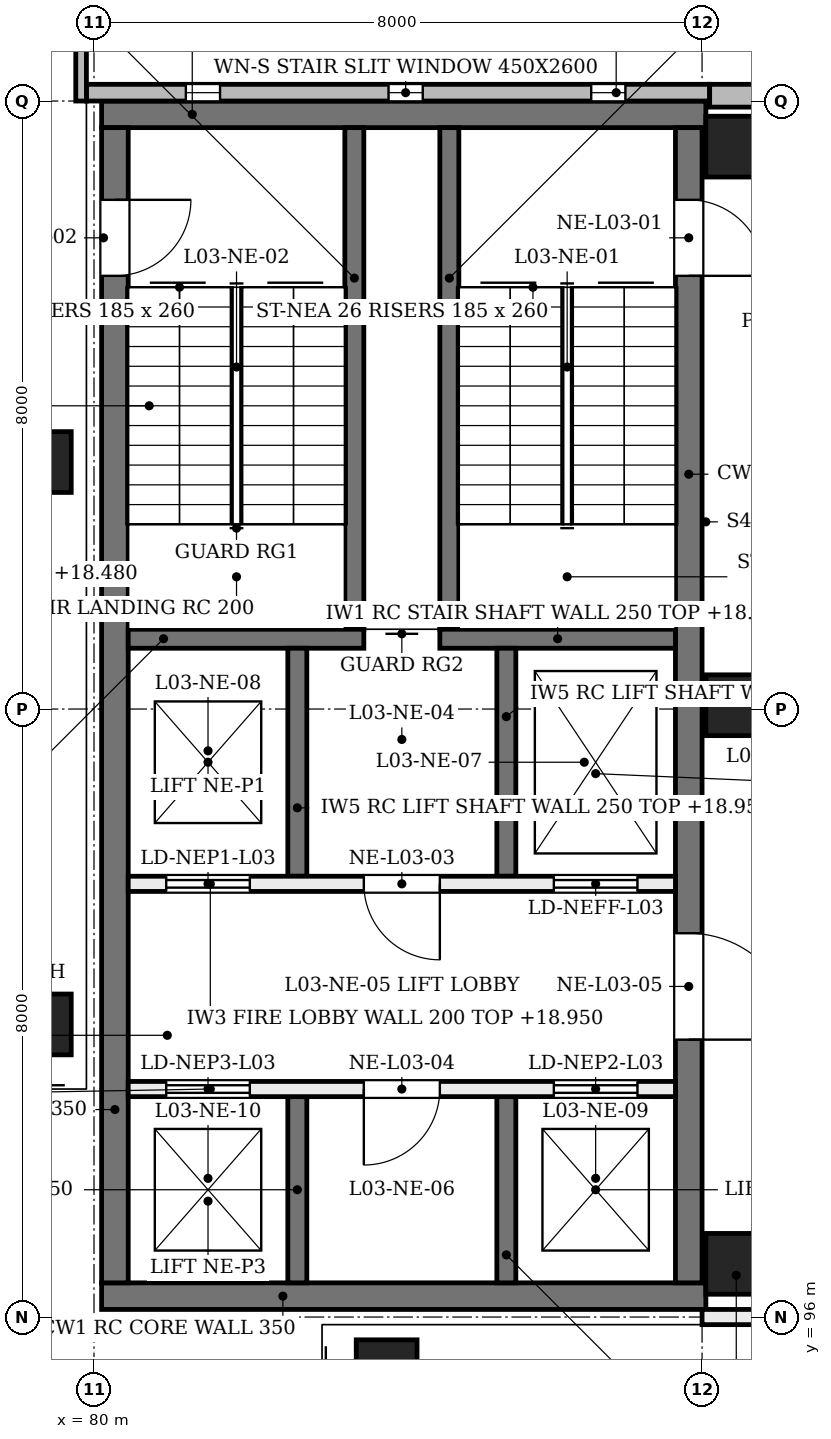
"""IFC4 building model, lengths in metres.
Left out: names, types, materials, properties, quantities, classifications, styles, units other than length and angle.
Written with IfcOpenShell. Run it as: python <this file> out.ifc"""

import sys

from ifc_helpers import new_model, si_unit, direction, frame, frame_2d, origin, origin_2d, place, context, subcontext, project, spatial, rectangle, extrude, element, fill, save


model = new_model("IFC4")
c1 = context("Model", 3, precision=1e-05, world=origin(), true_north=direction((0.0, 1.0)))
c2 = subcontext(c1, "Body", "Model", "MODEL_VIEW")
j1 = project(units=[si_unit("LENGTHUNIT", "METRE"), si_unit("PLANEANGLEUNIT", "RADIAN")], contexts=[c1])
p1 = place(None, origin())
s1 = spatial("IfcSite", under=j1, at=p1, CompositionType="ELEMENT")
p2 = place(p1, origin())
s2 = spatial("IfcBuilding", under=s1, at=p2, CompositionType="ELEMENT")
p3 = place(p2, frame((0.0, 0.0, 14.4)))
s3 = spatial("IfcBuildingStorey", under=s2, at=p3, CompositionType="ELEMENT", Elevation=14.4)
for number, where, z_axis, x_axis in (
    (1, (80.1, 96.275, 0.0), (0.0, 0.0, 1.0), (1.0, 0.0, 0.0)),
    (2, (80.1, 111.825, 0.0), (0.0, 0.0, 1.0), (1.0, 0.0, 0.0)),
):
    element("IfcWall", number, at=place(p3, frame(where, z_axis=z_axis, x_axis=x_axis)), inside=s3, PredefinedType="SHEAR", context=c2, shape_type="SweptSolid", body=[
        extrude(rectangle(XDim=7.95, YDim=0.35, at=frame_2d((3.975, 0.0))), origin(), (0.0, 0.0, 1.0), 4.58),
    ])
p4 = place(p3, frame((80.275, 96.45, 0.0), z_axis=(0.0, 0.0, 1.0), x_axis=(0.0, 1.0, 0.0)))
e3 = element("IfcWall", 3, at=p4, inside=s3, PredefinedType="SHEAR", context=c2, shape_type="SweptSolid", body=[
    extrude(rectangle(XDim=15.2, YDim=0.35, at=frame_2d((7.6, 0.0))), origin(), (0.0, 0.0, 1.0), 4.58),
])
p5 = place(p4, frame((13.25, 0.0, 0.0)))
e4 = element("IfcOpeningElement", 4, at=p5, cuts=e3, PredefinedType="OPENING", context=c2, shape_type="SweptSolid", body=[
    extrude(rectangle(XDim=1.0, YDim=2.1, at=frame_2d((0.5, 1.05))), frame((0.0, 0.185, 0.0), z_axis=(0.0, -1.0, 0.0), x_axis=(1.0, 0.0, 0.0)), (0.0, 0.0, 1.0), 0.37),
])
p6 = place(p3, frame((87.825, 96.45, 0.0), z_axis=(0.0, 0.0, 1.0), x_axis=(0.0, 1.0, 0.0)))
e5 = element("IfcWall", 5, at=p6, inside=s3, PredefinedType="SHEAR", context=c2, shape_type="SweptSolid", body=[
    extrude(rectangle(XDim=15.2, YDim=0.35, at=frame_2d((7.6, 0.0))), origin(), (0.0, 0.0, 1.0), 4.58),
])
p7 = place(p6, frame((13.25, 0.0, 0.0)))
e6 = element("IfcOpeningElement", 6, at=p7, cuts=e5, PredefinedType="OPENING", context=c2, shape_type="SweptSolid", body=[
    extrude(rectangle(XDim=1.0, YDim=2.1, at=frame_2d((0.5, 1.05))), frame((0.0, 0.185, 0.0), z_axis=(0.0, -1.0, 0.0), x_axis=(1.0, 0.0, 0.0)), (0.0, 0.0, 1.0), 0.37),
])
p8 = place(p6, frame((3.2, 0.0, 0.0)))
e7 = element("IfcOpeningElement", 7, at=p8, cuts=e5, PredefinedType="OPENING", context=c2, shape_type="SweptSolid", body=[
    extrude(rectangle(XDim=1.4, YDim=2.1, at=frame_2d((0.7, 1.05))), frame((0.0, 0.185, 0.0), z_axis=(0.0, -1.0, 0.0), x_axis=(1.0, 0.0, 0.0)), (0.0, 0.0, 1.0), 0.37),
])
for number, where, z_axis, x_axis in (
    (8, (88.45, 96.7, 0.0), (0.0, 0.0, 1.0), (1.0, 0.0, 0.0)),
    (9, (88.45, 104.05, 0.0), (0.0, 0.0, 1.0), (1.0, 0.0, 0.0)),
    (10, (88.45, 111.4, 0.0), (0.0, 0.0, 1.0), (1.0, 0.0, 0.0)),
):
    element("IfcColumn", number, at=place(p3, frame(where, z_axis=z_axis, x_axis=x_axis)), inside=s3, PredefinedType="COLUMN", context=c2, shape_type="SweptSolid", body=[
        extrude(rectangle(XDim=0.8, YDim=0.8, at=origin_2d()), origin(), (0.0, 0.0, 1.0), 4.8),
    ])
for number, where, z_axis, x_axis in (
    (11, (79.3, 99.6, 0.0), (0.0, 0.204, 0.979), (-1.0, 0.0, 0.0)),
    (12, (79.3, 107.0, 0.0), (0.0, 0.204, 0.979), (-1.0, 0.0, 0.0)),
    (13, (83.6, 95.3, 0.0), (0.204, 0.0, 0.979), (0.0, 1.0, 0.0)),
):
    element("IfcColumn", number, at=place(p3, frame(where, z_axis=z_axis, x_axis=x_axis)), inside=s3, PredefinedType="COLUMN", context=c2, shape_type="SweptSolid", body=[
        extrude(rectangle(XDim=0.8, YDim=0.8, at=origin_2d()), origin(), (0.0, 0.0, 1.0), 4.903),
    ])
p9 = place(p3, frame((79.9, 112.11, 0.0), z_axis=(0.0, 0.0, 1.0), x_axis=(1.0, 0.0, 0.0)))
e14 = element("IfcWall", 14, at=p9, inside=s3, PredefinedType="SOLIDWALL", context=c2, shape_type="SweptSolid", body=[
    extrude(rectangle(XDim=8.2, YDim=0.22, at=frame_2d((4.1, 0.0))), origin(), (0.0, 0.0, 1.0), 3.9),
])
p10 = place(p9, frame((1.308, 0.0, 0.9)))
e15 = element("IfcOpeningElement", 15, at=p10, cuts=e14, PredefinedType="OPENING", context=c2, shape_type="SweptSolid", body=[
    extrude(rectangle(XDim=0.45, YDim=2.6, at=frame_2d((0.225, 1.3))), frame((0.0, 0.12, 0.0), z_axis=(0.0, -1.0, 0.0), x_axis=(1.0, 0.0, 0.0)), (0.0, 0.0, 1.0), 0.24),
])
p11 = place(p9, frame((3.975, 0.0, 0.9)))
e16 = element("IfcOpeningElement", 16, at=p11, cuts=e14, PredefinedType="OPENING", context=c2, shape_type="SweptSolid", body=[
    extrude(rectangle(XDim=0.45, YDim=2.6, at=frame_2d((0.225, 1.3))), frame((0.0, 0.12, 0.0), z_axis=(0.0, -1.0, 0.0), x_axis=(1.0, 0.0, 0.0)), (0.0, 0.0, 1.0), 0.24),
])
p12 = place(p9, frame((6.642, 0.0, 0.9)))
e17 = element("IfcOpeningElement", 17, at=p12, cuts=e14, PredefinedType="OPENING", context=c2, shape_type="SweptSolid", body=[
    extrude(rectangle(XDim=0.45, YDim=2.6, at=frame_2d((0.225, 1.3))), frame((0.0, 0.12, 0.0), z_axis=(0.0, -1.0, 0.0), x_axis=(1.0, 0.0, 0.0)), (0.0, 0.0, 1.0), 0.24),
])
p13 = place(p3, frame((88.1, 112.07, 0.0), z_axis=(0.0, 0.0, 1.0), x_axis=(1.0, 0.0, 0.0)))
e18 = element("IfcWall", 18, at=p13, inside=s3, PredefinedType="SOLIDWALL", context=c2, shape_type="SweptSolid", body=[
    extrude(rectangle(XDim=7.9, YDim=0.3, at=frame_2d((3.95, 0.0))), origin(), (0.0, 0.0, 1.0), 3.9),
])
p14 = place(p13, frame((0.717, 0.0, 0.75)))
e19 = element("IfcOpeningElement", 19, at=p14, cuts=e18, PredefinedType="OPENING", context=c2, shape_type="SweptSolid", body=[
    extrude(rectangle(XDim=1.2, YDim=3.1, at=frame_2d((0.6, 1.55))), frame((0.0, 0.16, 0.0), z_axis=(0.0, -1.0, 0.0), x_axis=(1.0, 0.0, 0.0)), (0.0, 0.0, 1.0), 0.32),
])
p15 = place(p13, frame((3.35, 0.0, 0.75)))
e20 = element("IfcOpeningElement", 20, at=p15, cuts=e18, PredefinedType="OPENING", context=c2, shape_type="SweptSolid", body=[
    extrude(rectangle(XDim=1.2, YDim=3.1, at=frame_2d((0.6, 1.55))), frame((0.0, 0.16, 0.0), z_axis=(0.0, -1.0, 0.0), x_axis=(1.0, 0.0, 0.0)), (0.0, 0.0, 1.0), 0.32),
])
p16 = place(p13, frame((5.983, 0.0, 0.75)))
e21 = element("IfcOpeningElement", 21, at=p16, cuts=e18, PredefinedType="OPENING", context=c2, shape_type="SweptSolid", body=[
    extrude(rectangle(XDim=1.2, YDim=3.1, at=frame_2d((0.6, 1.55))), frame((0.0, 0.16, 0.0), z_axis=(0.0, -1.0, 0.0), x_axis=(1.0, 0.0, 0.0)), (0.0, 0.0, 1.0), 0.32),
])
p17 = place(p3, frame((79.83, 112.0, 0.0), z_axis=(0.0, 0.0, 1.0), x_axis=(0.0, 1.0, 0.0)))
e22 = element("IfcWall", 22, at=p17, inside=s3, PredefinedType="SOLIDWALL", context=c2, shape_type="SweptSolid", body=[
    extrude(rectangle(XDim=3.0, YDim=0.14, at=frame_2d((1.5, 0.0))), origin(), (0.0, 0.0, 1.0), 3.9),
])
for number, where, z_axis, x_axis in (
    (23, (84.675, 111.65, 0.0), (0.0, 0.0, 1.0), (0.0, -1.0, 0.0)),
    (24, (83.425, 111.65, 0.0), (0.0, 0.0, 1.0), (0.0, -1.0, 0.0)),
):
    element("IfcWall", number, at=place(p3, frame(where, z_axis=z_axis, x_axis=x_axis)), inside=s3, PredefinedType="SOLIDWALL", context=c2, shape_type="SweptSolid", body=[
        extrude(rectangle(XDim=6.6, YDim=0.25, at=frame_2d((3.3, 0.0))), origin(), (0.0, 0.0, 1.0), 4.55),
    ])
p18 = place(p3, frame((87.65, 104.925, 0.0), z_axis=(0.0, 0.0, 1.0), x_axis=(-1.0, 0.0, 0.0)))
e25 = element("IfcWall", 25, at=p18, inside=s3, PredefinedType="SOLIDWALL", context=c2, shape_type="SweptSolid", body=[
    extrude(rectangle(XDim=3.1, YDim=0.25, at=frame_2d((1.55, 0.0))), origin(), (0.0, 0.0, 1.0), 4.55),
])
p19 = place(p3, frame((83.55, 104.925, 0.0), z_axis=(0.0, 0.0, 1.0), x_axis=(-1.0, 0.0, 0.0)))
e26 = element("IfcWall", 26, at=p19, inside=s3, PredefinedType="SOLIDWALL", context=c2, shape_type="SweptSolid", body=[
    extrude(rectangle(XDim=3.1, YDim=0.25, at=frame_2d((1.55, 0.0))), origin(), (0.0, 0.0, 1.0), 4.55),
])
p20 = place(p3, frame((85.425, 104.8, 0.0), z_axis=(0.0, 0.0, 1.0), x_axis=(0.0, -1.0, 0.0)))
e27 = element("IfcWall", 27, at=p20, inside=s3, PredefinedType="SOLIDWALL", context=c2, shape_type="SweptSolid", body=[
    extrude(rectangle(XDim=3.0, YDim=0.25, at=frame_2d((1.5, 0.0))), origin(), (0.0, 0.0, 1.0), 4.55),
])
p21 = place(p3, frame((85.425, 98.9, 0.0), z_axis=(0.0, 0.0, 1.0), x_axis=(0.0, -1.0, 0.0)))
e28 = element("IfcWall", 28, at=p21, inside=s3, PredefinedType="SOLIDWALL", context=c2, shape_type="SweptSolid", body=[
    extrude(rectangle(XDim=2.45, YDim=0.25, at=frame_2d((1.225, 0.0))), origin(), (0.0, 0.0, 1.0), 4.55),
])
p22 = place(p3, frame((82.675, 104.8, 0.0), z_axis=(0.0, 0.0, 1.0), x_axis=(0.0, -1.0, 0.0)))
e29 = element("IfcWall", 29, at=p22, inside=s3, PredefinedType="SOLIDWALL", context=c2, shape_type="SweptSolid", body=[
    extrude(rectangle(XDim=3.0, YDim=0.25, at=frame_2d((1.5, 0.0))), origin(), (0.0, 0.0, 1.0), 4.55),
])
p23 = place(p3, frame((82.675, 98.9, 0.0), z_axis=(0.0, 0.0, 1.0), x_axis=(0.0, -1.0, 0.0)))
e30 = element("IfcWall", 30, at=p23, inside=s3, PredefinedType="SOLIDWALL", context=c2, shape_type="SweptSolid", body=[
    extrude(rectangle(XDim=2.45, YDim=0.25, at=frame_2d((1.225, 0.0))), origin(), (0.0, 0.0, 1.0), 4.55),
])
p24 = place(p3, frame((87.65, 101.7, 0.0), z_axis=(0.0, 0.0, 1.0), x_axis=(-1.0, 0.0, 0.0)))
e31 = element("IfcWall", 31, at=p24, inside=s3, PredefinedType="SOLIDWALL", context=c2, shape_type="SweptSolid", body=[
    extrude(rectangle(XDim=7.2, YDim=0.2, at=frame_2d((3.6, 0.0))), origin(), (0.0, 0.0, 1.0), 4.55),
])
p25 = place(p24, frame((0.5, 0.0, 0.0)))
e32 = element("IfcOpeningElement", 32, at=p25, cuts=e31, PredefinedType="OPENING", context=c2, shape_type="SweptSolid", body=[
    extrude(rectangle(XDim=1.1, YDim=2.1, at=frame_2d((0.55, 1.05))), frame((0.0, 0.11, 0.0), z_axis=(0.0, -1.0, 0.0), x_axis=(1.0, 0.0, 0.0)), (0.0, 0.0, 1.0), 0.22),
])
p26 = place(p24, frame((5.6, 0.0, 0.0)))
e33 = element("IfcOpeningElement", 33, at=p26, cuts=e31, PredefinedType="OPENING", context=c2, shape_type="SweptSolid", body=[
    extrude(rectangle(XDim=1.1, YDim=2.1, at=frame_2d((0.55, 1.05))), frame((0.0, 0.11, 0.0), z_axis=(0.0, -1.0, 0.0), x_axis=(1.0, 0.0, 0.0)), (0.0, 0.0, 1.0), 0.22),
])
p27 = place(p24, frame((3.1, 0.0, 0.0)))
e34 = element("IfcOpeningElement", 34, at=p27, cuts=e31, PredefinedType="OPENING", context=c2, shape_type="SweptSolid", body=[
    extrude(rectangle(XDim=1.0, YDim=2.1, at=frame_2d((0.5, 1.05))), frame((0.0, 0.11, 0.0), z_axis=(0.0, -1.0, 0.0), x_axis=(1.0, 0.0, 0.0)), (0.0, 0.0, 1.0), 0.22),
])
p28 = place(p3, frame((87.65, 99.0, 0.0), z_axis=(0.0, 0.0, 1.0), x_axis=(-1.0, 0.0, 0.0)))
e35 = element("IfcWall", 35, at=p28, inside=s3, PredefinedType="SOLIDWALL", context=c2, shape_type="SweptSolid", body=[
    extrude(rectangle(XDim=7.2, YDim=0.2, at=frame_2d((3.6, 0.0))), origin(), (0.0, 0.0, 1.0), 4.55),
])
p29 = place(p28, frame((0.5, 0.0, 0.0)))
e36 = element("IfcOpeningElement", 36, at=p29, cuts=e35, PredefinedType="OPENING", context=c2, shape_type="SweptSolid", body=[
    extrude(rectangle(XDim=1.1, YDim=2.1, at=frame_2d((0.55, 1.05))), frame((0.0, 0.11, 0.0), z_axis=(0.0, -1.0, 0.0), x_axis=(1.0, 0.0, 0.0)), (0.0, 0.0, 1.0), 0.22),
])
p30 = place(p28, frame((5.6, 0.0, 0.0)))
e37 = element("IfcOpeningElement", 37, at=p30, cuts=e35, PredefinedType="OPENING", context=c2, shape_type="SweptSolid", body=[
    extrude(rectangle(XDim=1.1, YDim=2.1, at=frame_2d((0.55, 1.05))), frame((0.0, 0.11, 0.0), z_axis=(0.0, -1.0, 0.0), x_axis=(1.0, 0.0, 0.0)), (0.0, 0.0, 1.0), 0.22),
])
p31 = place(p28, frame((3.1, 0.0, 0.0)))
e38 = element("IfcOpeningElement", 38, at=p31, cuts=e35, PredefinedType="OPENING", context=c2, shape_type="SweptSolid", body=[
    extrude(rectangle(XDim=1.0, YDim=2.1, at=frame_2d((0.5, 1.05))), frame((0.0, 0.11, 0.0), z_axis=(0.0, -1.0, 0.0), x_axis=(1.0, 0.0, 0.0)), (0.0, 0.0, 1.0), 0.22),
])
p32 = place(p3, frame((88.0, 96.0, 0.0), z_axis=(0.0, 0.0, 1.0), x_axis=(1.0, 0.0, 0.0)))
e39 = element("IfcWall", 39, at=p32, inside=s3, PredefinedType="PARTITIONING", context=c2, shape_type="SweptSolid", body=[
    extrude(rectangle(XDim=3.6, YDim=0.2, at=frame_2d((1.8, 0.0))), origin(), (0.0, 0.0, 1.0), 3.88),
])
p33 = place(p32, frame((1.3, 0.0, 0.0)))
e40 = element("IfcOpeningElement", 40, at=p33, cuts=e39, PredefinedType="OPENING", context=c2, shape_type="SweptSolid", body=[
    extrude(rectangle(XDim=1.0, YDim=2.1, at=frame_2d((0.5, 1.05))), frame((0.0, 0.11, 0.0), z_axis=(0.0, -1.0, 0.0), x_axis=(1.0, 0.0, 0.0)), (0.0, 0.0, 1.0), 0.22),
])
p34 = place(p10, origin())
e41 = element("IfcWindow", 41, at=p34, inside=s3, PartitioningType="SINGLE_PANEL", PredefinedType="WINDOW", context=c2, shape_type="SweptSolid", body=[
    extrude(rectangle(XDim=0.45, YDim=2.6, at=frame_2d((0.225, 1.3))), frame((0.0, 0.03, 0.0), z_axis=(0.0, -1.0, 0.0), x_axis=(1.0, 0.0, 0.0)), (0.0, 0.0, 1.0), 0.06),
])
fill(e15, e41)
p35 = place(p11, origin())
e42 = element("IfcWindow", 42, at=p35, inside=s3, PartitioningType="SINGLE_PANEL", PredefinedType="WINDOW", context=c2, shape_type="SweptSolid", body=[
    extrude(rectangle(XDim=0.45, YDim=2.6, at=frame_2d((0.225, 1.3))), frame((0.0, 0.03, 0.0), z_axis=(0.0, -1.0, 0.0), x_axis=(1.0, 0.0, 0.0)), (0.0, 0.0, 1.0), 0.06),
])
fill(e16, e42)
p36 = place(p12, origin())
e43 = element("IfcWindow", 43, at=p36, inside=s3, PartitioningType="SINGLE_PANEL", PredefinedType="WINDOW", context=c2, shape_type="SweptSolid", body=[
    extrude(rectangle(XDim=0.45, YDim=2.6, at=frame_2d((0.225, 1.3))), frame((0.0, 0.03, 0.0), z_axis=(0.0, -1.0, 0.0), x_axis=(1.0, 0.0, 0.0)), (0.0, 0.0, 1.0), 0.06),
])
fill(e17, e43)
p37 = place(p7, frame((1.0, 0.0, 0.0), z_axis=(0.0, 0.0, 1.0), x_axis=(-1.0, 0.0, 0.0)))
e44 = element("IfcDoor", 44, at=p37, inside=s3, OperationType="SINGLE_SWING_LEFT", PredefinedType="DOOR", context=c2, shape_type="SweptSolid", body=[
    extrude(rectangle(XDim=1.0, YDim=2.1, at=frame_2d((0.5, 1.05))), frame((0.0, 0.025, 0.0), z_axis=(0.0, -1.0, 0.0), x_axis=(1.0, 0.0, 0.0)), (0.0, 0.0, 1.0), 0.05),
])
fill(e6, e44)
p38 = place(p5, origin())
e45 = element("IfcDoor", 45, at=p38, inside=s3, OperationType="SINGLE_SWING_RIGHT", PredefinedType="DOOR", context=c2, shape_type="SweptSolid", body=[
    extrude(rectangle(XDim=1.0, YDim=2.1, at=frame_2d((0.5, 1.05))), frame((0.0, 0.025, 0.0), z_axis=(0.0, -1.0, 0.0), x_axis=(1.0, 0.0, 0.0)), (0.0, 0.0, 1.0), 0.05),
])
fill(e4, e45)
p39 = place(p25, origin())
e46 = element("IfcDoor", 46, at=p39, inside=s3, OperationType="DOUBLE_DOOR_SLIDING", PredefinedType="DOOR", context=c2, shape_type="SweptSolid", body=[
    extrude(rectangle(XDim=1.1, YDim=2.1, at=frame_2d((0.55, 1.05))), frame((0.0, 0.025, 0.0), z_axis=(0.0, -1.0, 0.0), x_axis=(1.0, 0.0, 0.0)), (0.0, 0.0, 1.0), 0.05),
])
fill(e32, e46)
p40 = place(p26, origin())
e47 = element("IfcDoor", 47, at=p40, inside=s3, OperationType="DOUBLE_DOOR_SLIDING", PredefinedType="DOOR", context=c2, shape_type="SweptSolid", body=[
    extrude(rectangle(XDim=1.1, YDim=2.1, at=frame_2d((0.55, 1.05))), frame((0.0, 0.025, 0.0), z_axis=(0.0, -1.0, 0.0), x_axis=(1.0, 0.0, 0.0)), (0.0, 0.0, 1.0), 0.05),
])
fill(e33, e47)
p41 = place(p29, frame((1.1, 0.0, 0.0), z_axis=(0.0, 0.0, 1.0), x_axis=(-1.0, 0.0, 0.0)))
e48 = element("IfcDoor", 48, at=p41, inside=s3, OperationType="DOUBLE_DOOR_SLIDING", PredefinedType="DOOR", context=c2, shape_type="SweptSolid", body=[
    extrude(rectangle(XDim=1.1, YDim=2.1, at=frame_2d((0.55, 1.05))), frame((0.0, 0.025, 0.0), z_axis=(0.0, -1.0, 0.0), x_axis=(1.0, 0.0, 0.0)), (0.0, 0.0, 1.0), 0.05),
])
fill(e36, e48)
p42 = place(p30, frame((1.1, 0.0, 0.0), z_axis=(0.0, 0.0, 1.0), x_axis=(-1.0, 0.0, 0.0)))
e49 = element("IfcDoor", 49, at=p42, inside=s3, OperationType="DOUBLE_DOOR_SLIDING", PredefinedType="DOOR", context=c2, shape_type="SweptSolid", body=[
    extrude(rectangle(XDim=1.1, YDim=2.1, at=frame_2d((0.55, 1.05))), frame((0.0, 0.025, 0.0), z_axis=(0.0, -1.0, 0.0), x_axis=(1.0, 0.0, 0.0)), (0.0, 0.0, 1.0), 0.05),
])
fill(e37, e49)
p43 = place(p27, origin())
e50 = element("IfcDoor", 50, at=p43, inside=s3, OperationType="SINGLE_SWING_LEFT", PredefinedType="DOOR", context=c2, shape_type="SweptSolid", body=[
    extrude(rectangle(XDim=1.0, YDim=2.1, at=frame_2d((0.5, 1.05))), frame((0.0, 0.025, 0.0), z_axis=(0.0, -1.0, 0.0), x_axis=(1.0, 0.0, 0.0)), (0.0, 0.0, 1.0), 0.05),
])
fill(e34, e50)
p44 = place(p31, frame((1.0, 0.0, 0.0), z_axis=(0.0, 0.0, 1.0), x_axis=(-1.0, 0.0, 0.0)))
e51 = element("IfcDoor", 51, at=p44, inside=s3, OperationType="SINGLE_SWING_RIGHT", PredefinedType="DOOR", context=c2, shape_type="SweptSolid", body=[
    extrude(rectangle(XDim=1.0, YDim=2.1, at=frame_2d((0.5, 1.05))), frame((0.0, 0.025, 0.0), z_axis=(0.0, -1.0, 0.0), x_axis=(1.0, 0.0, 0.0)), (0.0, 0.0, 1.0), 0.05),
])
fill(e38, e51)
p45 = place(p8, frame((1.4, 0.0, 0.0), z_axis=(0.0, 0.0, 1.0), x_axis=(-1.0, 0.0, 0.0)))
e52 = element("IfcDoor", 52, at=p45, inside=s3, OperationType="SINGLE_SWING_LEFT", PredefinedType="DOOR", context=c2, shape_type="SweptSolid", body=[
    extrude(rectangle(XDim=1.4, YDim=2.1, at=frame_2d((0.7, 1.05))), frame((0.0, 0.025, 0.0), z_axis=(0.0, -1.0, 0.0), x_axis=(1.0, 0.0, 0.0)), (0.0, 0.0, 1.0), 0.05),
])
fill(e7, e52)
save(model, sys.argv[1])
